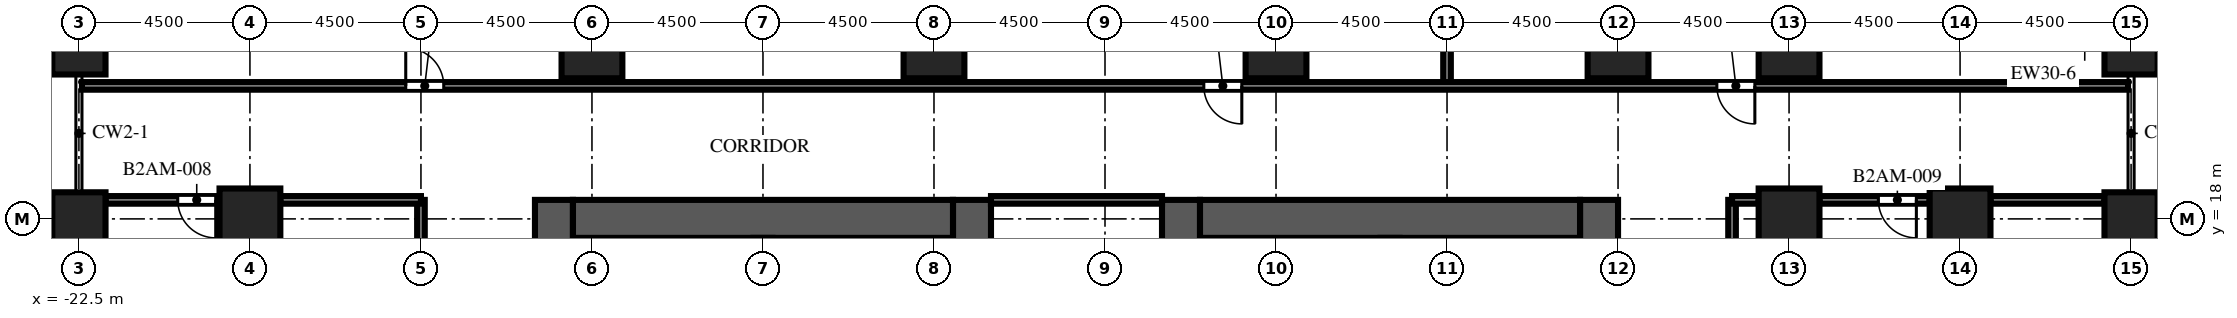
"""IFC4 building model, lengths in metres.
Left out: names, types, materials, properties, quantities, classifications, styles, units other than length and angle.
Written with IfcOpenShell. Run it as: python <this file> out.ifc"""

import sys

from ifc_helpers import new_model, si_unit, direction, frame, frame_2d, origin, origin_2d, place, context, subcontext, project, spatial, rectangle, extrude, element, fill, save


model = new_model("IFC4")
c1 = context("Model", 3, precision=1e-05, world=origin(), true_north=direction((0.0, 1.0)))
c2 = subcontext(c1, "Body", "Model", "MODEL_VIEW")
j1 = project(units=[si_unit("LENGTHUNIT", "METRE"), si_unit("PLANEANGLEUNIT", "RADIAN")], contexts=[c1])
p1 = place(None, origin())
s1 = spatial("IfcSite", under=j1, at=p1, CompositionType="ELEMENT")
p2 = place(p1, origin())
s2 = spatial("IfcBuilding", under=s1, at=p2, CompositionType="ELEMENT")
p3 = place(p2, frame((0.0, 0.0, 70.6)))
s3 = spatial("IfcBuildingStorey", under=s2, at=p3, CompositionType="ELEMENT", Elevation=70.6)
for number, where, z_axis, x_axis in (
    (1, (-22.5, 18.0, 0.0), (0.0, 0.0, 1.0), (1.0, 0.0, 0.0)),
    (2, (-22.5, 22.5, 0.0), (0.0, 0.0, 1.0), (1.0, 0.0, 0.0)),
    (3, (31.5, 18.0, 0.0), (0.0, 0.0, 1.0), (1.0, 0.0, 0.0)),
    (4, (31.5, 22.5, 0.0), (0.0, 0.0, 1.0), (1.0, 0.0, 0.0)),
):
    element("IfcColumn", number, at=place(p3, frame(where, z_axis=z_axis, x_axis=x_axis)), inside=s3, PredefinedType="COLUMN", context=c2, shape_type="SweptSolid", body=[
        extrude(rectangle(XDim=1.4, YDim=1.4, at=origin_2d()), origin(), (0.0, 0.0, 1.0), 6.0),
    ])
for number, where, z_axis, x_axis in (
    (5, (-18.0, 18.0, 0.0), (0.0, 0.0, 1.0), (1.0, 0.0, 0.0)),
    (6, (-9.0, 22.5, 0.0), (0.0, 0.0, 1.0), (1.0, 0.0, 0.0)),
    (7, (0.0, 22.5, 0.0), (0.0, 0.0, 1.0), (1.0, 0.0, 0.0)),
    (8, (9.0, 22.5, 0.0), (0.0, 0.0, 1.0), (1.0, 0.0, 0.0)),
    (9, (18.0, 22.5, 0.0), (0.0, 0.0, 1.0), (1.0, 0.0, 0.0)),
    (10, (22.5, 18.0, 0.0), (0.0, 0.0, 1.0), (1.0, 0.0, 0.0)),
    (11, (22.5, 22.5, 0.0), (0.0, 0.0, 1.0), (1.0, 0.0, 0.0)),
    (12, (27.0, 18.0, 0.0), (0.0, 0.0, 1.0), (1.0, 0.0, 0.0)),
):
    element("IfcColumn", number, at=place(p3, frame(where, z_axis=z_axis, x_axis=x_axis)), inside=s3, PredefinedType="COLUMN", context=c2, shape_type="SweptSolid", body=[
        extrude(rectangle(XDim=1.6, YDim=1.6, at=origin_2d()), origin(), (0.0, 0.0, 1.0), 6.0),
    ])
p4 = place(p3, frame((-10.0, -9.0, 0.0), z_axis=(0.0, 0.0, 1.0), x_axis=(0.0, 1.0, 0.0)))
e13 = element("IfcWall", 13, at=p4, inside=s3, PredefinedType="SHEAR", context=c2, shape_type="SweptSolid", body=[
    extrude(rectangle(XDim=27.5, YDim=1.0, at=frame_2d((13.75, 0.0))), origin(), (0.0, 0.0, 1.0), 6.0),
])
p5 = place(p4, frame((12.55, 0.0, 0.0)))
e14 = element("IfcOpeningElement", 14, at=p5, cuts=e13, PredefinedType="OPENING", context=c2, shape_type="SweptSolid", body=[
    extrude(rectangle(XDim=2.4, YDim=2.4, at=frame_2d((1.2, 1.2))), frame((0.0, 0.51, 0.0), z_axis=(0.0, -1.0, 0.0), x_axis=(1.0, 0.0, 0.0)), (0.0, 0.0, 1.0), 1.02),
])
p6 = place(p4, frame((6.825, 0.0, 0.0)))
e15 = element("IfcOpeningElement", 15, at=p6, cuts=e13, PredefinedType="OPENING", context=c2, shape_type="SweptSolid", body=[
    extrude(rectangle(XDim=1.2, YDim=2.1, at=frame_2d((0.6, 1.05))), frame((0.0, 0.51, 0.0), z_axis=(0.0, -1.0, 0.0), x_axis=(1.0, 0.0, 0.0)), (0.0, 0.0, 1.0), 1.02),
])
p7 = place(p4, frame((19.475, 0.0, 0.0)))
e16 = element("IfcOpeningElement", 16, at=p7, cuts=e13, PredefinedType="OPENING", context=c2, shape_type="SweptSolid", body=[
    extrude(rectangle(XDim=1.2, YDim=2.1, at=frame_2d((0.6, 1.05))), frame((0.0, 0.51, 0.0), z_axis=(0.0, -1.0, 0.0), x_axis=(1.0, 0.0, 0.0)), (0.0, 0.0, 1.0), 1.02),
])
p8 = place(p3, frame((1.0, -9.0, 0.0), z_axis=(0.0, 0.0, 1.0), x_axis=(0.0, 1.0, 0.0)))
e17 = element("IfcWall", 17, at=p8, inside=s3, PredefinedType="SHEAR", context=c2, shape_type="SweptSolid", body=[
    extrude(rectangle(XDim=27.5, YDim=1.0, at=frame_2d((13.75, 0.0))), origin(), (0.0, 0.0, 1.0), 6.0),
])
p9 = place(p8, frame((12.55, 0.0, 0.0)))
e18 = element("IfcOpeningElement", 18, at=p9, cuts=e17, PredefinedType="OPENING", context=c2, shape_type="SweptSolid", body=[
    extrude(rectangle(XDim=2.4, YDim=2.4, at=frame_2d((1.2, 1.2))), frame((0.0, 0.51, 0.0), z_axis=(0.0, -1.0, 0.0), x_axis=(1.0, 0.0, 0.0)), (0.0, 0.0, 1.0), 1.02),
])
p10 = place(p8, frame((5.475, 0.0, 0.0)))
e19 = element("IfcOpeningElement", 19, at=p10, cuts=e17, PredefinedType="OPENING", context=c2, shape_type="SweptSolid", body=[
    extrude(rectangle(XDim=1.2, YDim=2.1, at=frame_2d((0.6, 1.05))), frame((0.0, 0.51, 0.0), z_axis=(0.0, -1.0, 0.0), x_axis=(1.0, 0.0, 0.0)), (0.0, 0.0, 1.0), 1.02),
])
p11 = place(p8, frame((19.475, 0.0, 0.0)))
e20 = element("IfcOpeningElement", 20, at=p11, cuts=e17, PredefinedType="OPENING", context=c2, shape_type="SweptSolid", body=[
    extrude(rectangle(XDim=1.0, YDim=2.1, at=frame_2d((0.5, 1.05))), frame((0.0, 0.51, 0.0), z_axis=(0.0, -1.0, 0.0), x_axis=(1.0, 0.0, 0.0)), (0.0, 0.0, 1.0), 1.02),
])
p12 = place(p8, frame((21.106, 0.0, 0.0)))
e21 = element("IfcOpeningElement", 21, at=p12, cuts=e17, PredefinedType="OPENING", context=c2, shape_type="SweptSolid", body=[
    extrude(rectangle(XDim=1.0, YDim=2.1, at=frame_2d((0.5, 1.05))), frame((0.0, 0.51, 0.0), z_axis=(0.0, -1.0, 0.0), x_axis=(1.0, 0.0, 0.0)), (0.0, 0.0, 1.0), 1.02),
])
p13 = place(p8, frame((23.1, 0.0, 0.0)))
e22 = element("IfcOpeningElement", 22, at=p13, cuts=e17, PredefinedType="OPENING", context=c2, shape_type="SweptSolid", body=[
    extrude(rectangle(XDim=1.0, YDim=2.1, at=frame_2d((0.5, 1.05))), frame((0.0, 0.51, 0.0), z_axis=(0.0, -1.0, 0.0), x_axis=(1.0, 0.0, 0.0)), (0.0, 0.0, 1.0), 1.02),
])
p14 = place(p8, frame((25.094, 0.0, 0.0)))
e23 = element("IfcOpeningElement", 23, at=p14, cuts=e17, PredefinedType="OPENING", context=c2, shape_type="SweptSolid", body=[
    extrude(rectangle(XDim=1.0, YDim=2.1, at=frame_2d((0.5, 1.05))), frame((0.0, 0.51, 0.0), z_axis=(0.0, -1.0, 0.0), x_axis=(1.0, 0.0, 0.0)), (0.0, 0.0, 1.0), 1.02),
])
p15 = place(p3, frame((-9.5, 18.0, 0.0), z_axis=(0.0, 0.0, 1.0), x_axis=(1.0, 0.0, 0.0)))
e24 = element("IfcWall", 24, at=p15, inside=s3, PredefinedType="SHEAR", context=c2, shape_type="SweptSolid", body=[
    extrude(rectangle(XDim=10.0, YDim=1.0, at=frame_2d((5.0, 0.0))), origin(), (0.0, 0.0, 1.0), 6.0),
])
p16 = place(p3, frame((6.5, -9.0, 0.0), z_axis=(0.0, 0.0, 1.0), x_axis=(0.0, 1.0, 0.0)))
e25 = element("IfcWall", 25, at=p16, inside=s3, PredefinedType="SHEAR", context=c2, shape_type="SweptSolid", body=[
    extrude(rectangle(XDim=27.5, YDim=1.0, at=frame_2d((13.75, 0.0))), origin(), (0.0, 0.0, 1.0), 6.0),
])
p17 = place(p16, frame((12.55, 0.0, 0.0)))
e26 = element("IfcOpeningElement", 26, at=p17, cuts=e25, PredefinedType="OPENING", context=c2, shape_type="SweptSolid", body=[
    extrude(rectangle(XDim=2.4, YDim=2.4, at=frame_2d((1.2, 1.2))), frame((0.0, 0.51, 0.0), z_axis=(0.0, -1.0, 0.0), x_axis=(1.0, 0.0, 0.0)), (0.0, 0.0, 1.0), 1.02),
])
p18 = place(p16, frame((5.475, 0.0, 0.0)))
e27 = element("IfcOpeningElement", 27, at=p18, cuts=e25, PredefinedType="OPENING", context=c2, shape_type="SweptSolid", body=[
    extrude(rectangle(XDim=1.2, YDim=2.1, at=frame_2d((0.6, 1.05))), frame((0.0, 0.51, 0.0), z_axis=(0.0, -1.0, 0.0), x_axis=(1.0, 0.0, 0.0)), (0.0, 0.0, 1.0), 1.02),
])
p19 = place(p16, frame((19.475, 0.0, 0.0)))
e28 = element("IfcOpeningElement", 28, at=p19, cuts=e25, PredefinedType="OPENING", context=c2, shape_type="SweptSolid", body=[
    extrude(rectangle(XDim=1.0, YDim=2.1, at=frame_2d((0.5, 1.05))), frame((0.0, 0.51, 0.0), z_axis=(0.0, -1.0, 0.0), x_axis=(1.0, 0.0, 0.0)), (0.0, 0.0, 1.0), 1.02),
])
p20 = place(p16, frame((21.106, 0.0, 0.0)))
e29 = element("IfcOpeningElement", 29, at=p20, cuts=e25, PredefinedType="OPENING", context=c2, shape_type="SweptSolid", body=[
    extrude(rectangle(XDim=1.0, YDim=2.1, at=frame_2d((0.5, 1.05))), frame((0.0, 0.51, 0.0), z_axis=(0.0, -1.0, 0.0), x_axis=(1.0, 0.0, 0.0)), (0.0, 0.0, 1.0), 1.02),
])
p21 = place(p16, frame((23.1, 0.0, 0.0)))
e30 = element("IfcOpeningElement", 30, at=p21, cuts=e25, PredefinedType="OPENING", context=c2, shape_type="SweptSolid", body=[
    extrude(rectangle(XDim=1.0, YDim=2.1, at=frame_2d((0.5, 1.05))), frame((0.0, 0.51, 0.0), z_axis=(0.0, -1.0, 0.0), x_axis=(1.0, 0.0, 0.0)), (0.0, 0.0, 1.0), 1.02),
])
p22 = place(p16, frame((25.094, 0.0, 0.0)))
e31 = element("IfcOpeningElement", 31, at=p22, cuts=e25, PredefinedType="OPENING", context=c2, shape_type="SweptSolid", body=[
    extrude(rectangle(XDim=1.0, YDim=2.1, at=frame_2d((0.5, 1.05))), frame((0.0, 0.51, 0.0), z_axis=(0.0, -1.0, 0.0), x_axis=(1.0, 0.0, 0.0)), (0.0, 0.0, 1.0), 1.02),
])
p23 = place(p3, frame((17.5, -9.0, 0.0), z_axis=(0.0, 0.0, 1.0), x_axis=(0.0, 1.0, 0.0)))
e32 = element("IfcWall", 32, at=p23, inside=s3, PredefinedType="SHEAR", context=c2, shape_type="SweptSolid", body=[
    extrude(rectangle(XDim=27.5, YDim=1.0, at=frame_2d((13.75, 0.0))), origin(), (0.0, 0.0, 1.0), 6.0),
])
p24 = place(p23, frame((12.55, 0.0, 0.0)))
e33 = element("IfcOpeningElement", 33, at=p24, cuts=e32, PredefinedType="OPENING", context=c2, shape_type="SweptSolid", body=[
    extrude(rectangle(XDim=2.4, YDim=2.4, at=frame_2d((1.2, 1.2))), frame((0.0, 0.51, 0.0), z_axis=(0.0, -1.0, 0.0), x_axis=(1.0, 0.0, 0.0)), (0.0, 0.0, 1.0), 1.02),
])
p25 = place(p23, frame((6.825, 0.0, 0.0)))
e34 = element("IfcOpeningElement", 34, at=p25, cuts=e32, PredefinedType="OPENING", context=c2, shape_type="SweptSolid", body=[
    extrude(rectangle(XDim=1.2, YDim=2.1, at=frame_2d((0.6, 1.05))), frame((0.0, 0.51, 0.0), z_axis=(0.0, -1.0, 0.0), x_axis=(1.0, 0.0, 0.0)), (0.0, 0.0, 1.0), 1.02),
])
p26 = place(p23, frame((19.475, 0.0, 0.0)))
e35 = element("IfcOpeningElement", 35, at=p26, cuts=e32, PredefinedType="OPENING", context=c2, shape_type="SweptSolid", body=[
    extrude(rectangle(XDim=1.2, YDim=2.1, at=frame_2d((0.6, 1.05))), frame((0.0, 0.51, 0.0), z_axis=(0.0, -1.0, 0.0), x_axis=(1.0, 0.0, 0.0)), (0.0, 0.0, 1.0), 1.02),
])
p27 = place(p3, frame((7.0, 18.0, 0.0), z_axis=(0.0, 0.0, 1.0), x_axis=(1.0, 0.0, 0.0)))
e36 = element("IfcWall", 36, at=p27, inside=s3, PredefinedType="SHEAR", context=c2, shape_type="SweptSolid", body=[
    extrude(rectangle(XDim=10.0, YDim=1.0, at=frame_2d((5.0, 0.0))), origin(), (0.0, 0.0, 1.0), 6.0),
])
p28 = place(p3, frame((-13.5, -9.0, 0.0), z_axis=(0.0, 0.0, 1.0), x_axis=(0.0, 1.0, 0.0)))
e37 = element("IfcWall", 37, at=p28, inside=s3, PredefinedType="PARTITIONING", context=c2, shape_type="SweptSolid", body=[
    extrude(rectangle(XDim=27.5, YDim=0.2, at=frame_2d((13.75, 0.0))), origin(), (0.0, 0.0, 1.0), 5.4),
])
p29 = place(p28, frame((10.85, 0.0, 0.0)))
e38 = element("IfcOpeningElement", 38, at=p29, cuts=e37, PredefinedType="OPENING", context=c2, shape_type="SweptSolid", body=[
    extrude(rectangle(XDim=1.0, YDim=2.1, at=frame_2d((0.5, 1.05))), frame((0.0, 0.11, 0.0), z_axis=(0.0, -1.0, 0.0), x_axis=(1.0, 0.0, 0.0)), (0.0, 0.0, 1.0), 0.22),
])
p30 = place(p3, frame((13.5, 21.5, 0.0), z_axis=(0.0, 0.0, 1.0), x_axis=(0.0, 1.0, 0.0)))
e39 = element("IfcWall", 39, at=p30, inside=s3, PredefinedType="PARTITIONING", context=c2, shape_type="SweptSolid", body=[
    extrude(rectangle(XDim=4.8, YDim=0.2, at=frame_2d((2.4, 0.0))), origin(), (0.0, 0.0, 1.0), 5.4),
])
p31 = place(p3, frame((21.0, 18.5, 0.0), z_axis=(0.0, 0.0, 1.0), x_axis=(0.0, -1.0, 0.0)))
e40 = element("IfcWall", 40, at=p31, inside=s3, PredefinedType="PARTITIONING", context=c2, shape_type="SweptSolid", body=[
    extrude(rectangle(XDim=27.5, YDim=0.2, at=frame_2d((13.75, 0.0))), origin(), (0.0, 0.0, 1.0), 5.4),
])
p32 = place(p31, frame((19.4, 0.0, 0.0)))
e41 = element("IfcOpeningElement", 41, at=p32, cuts=e40, PredefinedType="OPENING", context=c2, shape_type="SweptSolid", body=[
    extrude(rectangle(XDim=1.0, YDim=2.1, at=frame_2d((0.5, 1.05))), frame((0.0, 0.11, 0.0), z_axis=(0.0, -1.0, 0.0), x_axis=(1.0, 0.0, 0.0)), (0.0, 0.0, 1.0), 0.22),
])
p33 = place(p3, frame((-18.8, 18.5, 0.0), z_axis=(0.0, 0.0, 1.0), x_axis=(-1.0, 0.0, 0.0)))
e42 = element("IfcWall", 42, at=p33, inside=s3, PredefinedType="PARTITIONING", context=c2, shape_type="SweptSolid", body=[
    extrude(rectangle(XDim=3.0, YDim=0.2, at=frame_2d((1.5, 0.0))), origin(), (0.0, 0.0, 1.0), 5.4),
])
p34 = place(p33, frame((0.1, 0.0, 0.0)))
e43 = element("IfcOpeningElement", 43, at=p34, cuts=e42, PredefinedType="OPENING", context=c2, shape_type="SweptSolid", body=[
    extrude(rectangle(XDim=1.0, YDim=2.1, at=frame_2d((0.5, 1.05))), frame((0.0, 0.11, 0.0), z_axis=(0.0, -1.0, 0.0), x_axis=(1.0, 0.0, 0.0)), (0.0, 0.0, 1.0), 0.22),
])
p35 = place(p3, frame((-17.2, 18.5, 0.0), z_axis=(0.0, 0.0, 1.0), x_axis=(1.0, 0.0, 0.0)))
e44 = element("IfcWall", 44, at=p35, inside=s3, PredefinedType="PARTITIONING", context=c2, shape_type="SweptSolid", body=[
    extrude(rectangle(XDim=3.7, YDim=0.2, at=frame_2d((1.85, 0.0))), origin(), (0.0, 0.0, 1.0), 5.4),
])
p36 = place(p3, frame((1.5, 18.5, 0.0), z_axis=(0.0, 0.0, 1.0), x_axis=(1.0, 0.0, 0.0)))
e45 = element("IfcWall", 45, at=p36, inside=s3, PredefinedType="PARTITIONING", context=c2, shape_type="SweptSolid", body=[
    extrude(rectangle(XDim=4.5, YDim=0.2, at=frame_2d((2.25, 0.0))), origin(), (0.0, 0.0, 1.0), 5.4),
])
p37 = place(p3, frame((21.0, 18.5, 0.0), z_axis=(0.0, 0.0, 1.0), x_axis=(1.0, 0.0, 0.0)))
e46 = element("IfcWall", 46, at=p37, inside=s3, PredefinedType="PARTITIONING", context=c2, shape_type="SweptSolid", body=[
    extrude(rectangle(XDim=0.7, YDim=0.2, at=frame_2d((0.35, 0.0))), origin(), (0.0, 0.0, 1.0), 5.4),
])
p38 = place(p3, frame((26.2, 18.5, 0.0), z_axis=(0.0, 0.0, 1.0), x_axis=(-1.0, 0.0, 0.0)))
e47 = element("IfcWall", 47, at=p38, inside=s3, PredefinedType="PARTITIONING", context=c2, shape_type="SweptSolid", body=[
    extrude(rectangle(XDim=2.9, YDim=0.2, at=frame_2d((1.45, 0.0))), origin(), (0.0, 0.0, 1.0), 5.4),
])
p39 = place(p38, frame((0.35, 0.0, 0.0)))
e48 = element("IfcOpeningElement", 48, at=p39, cuts=e47, PredefinedType="OPENING", context=c2, shape_type="SweptSolid", body=[
    extrude(rectangle(XDim=1.0, YDim=2.1, at=frame_2d((0.5, 1.05))), frame((0.0, 0.11, 0.0), z_axis=(0.0, -1.0, 0.0), x_axis=(1.0, 0.0, 0.0)), (0.0, 0.0, 1.0), 0.22),
])
p40 = place(p3, frame((27.8, 18.5, 0.0), z_axis=(0.0, 0.0, 1.0), x_axis=(1.0, 0.0, 0.0)))
e49 = element("IfcWall", 49, at=p40, inside=s3, PredefinedType="PARTITIONING", context=c2, shape_type="SweptSolid", body=[
    extrude(rectangle(XDim=3.0, YDim=0.2, at=frame_2d((1.5, 0.0))), origin(), (0.0, 0.0, 1.0), 5.4),
])
p41 = place(p3, frame((-22.42, 21.5, 0.0), z_axis=(0.0, 0.0, 1.0), x_axis=(1.0, 0.0, 0.0)))
e50 = element("IfcWall", 50, at=p41, inside=s3, PredefinedType="PARTITIONING", context=c2, shape_type="SweptSolid", body=[
    extrude(rectangle(XDim=53.84, YDim=0.2, at=frame_2d((26.92, 0.0))), origin(), (0.0, 0.0, 1.0), 5.4),
])
p42 = place(p41, frame((8.52, 0.0, 0.0)))
e51 = element("IfcOpeningElement", 51, at=p42, cuts=e50, PredefinedType="OPENING", context=c2, shape_type="SweptSolid", body=[
    extrude(rectangle(XDim=1.0, YDim=2.1, at=frame_2d((0.5, 1.05))), frame((0.0, 0.11, 0.0), z_axis=(0.0, -1.0, 0.0), x_axis=(1.0, 0.0, 0.0)), (0.0, 0.0, 1.0), 0.22),
])
p43 = place(p41, frame((29.52, 0.0, 0.0)))
e52 = element("IfcOpeningElement", 52, at=p43, cuts=e50, PredefinedType="OPENING", context=c2, shape_type="SweptSolid", body=[
    extrude(rectangle(XDim=1.0, YDim=2.1, at=frame_2d((0.5, 1.05))), frame((0.0, 0.11, 0.0), z_axis=(0.0, -1.0, 0.0), x_axis=(1.0, 0.0, 0.0)), (0.0, 0.0, 1.0), 0.22),
])
p44 = place(p41, frame((43.02, 0.0, 0.0)))
e53 = element("IfcOpeningElement", 53, at=p44, cuts=e50, PredefinedType="OPENING", context=c2, shape_type="SweptSolid", body=[
    extrude(rectangle(XDim=1.0, YDim=2.1, at=frame_2d((0.5, 1.05))), frame((0.0, 0.11, 0.0), z_axis=(0.0, -1.0, 0.0), x_axis=(1.0, 0.0, 0.0)), (0.0, 0.0, 1.0), 0.22),
])
p45 = place(p34, origin())
e54 = element("IfcDoor", 54, at=p45, inside=s3, OperationType="SINGLE_SWING_LEFT", PredefinedType="DOOR", context=c2, shape_type="SweptSolid", body=[
    extrude(rectangle(XDim=1.0, YDim=2.1, at=frame_2d((0.5, 1.05))), frame((0.0, 0.025, 0.0), z_axis=(0.0, -1.0, 0.0), x_axis=(1.0, 0.0, 0.0)), (0.0, 0.0, 1.0), 0.05),
])
fill(e43, e54)
p46 = place(p39, origin())
e55 = element("IfcDoor", 55, at=p46, inside=s3, OperationType="SINGLE_SWING_LEFT", PredefinedType="DOOR", context=c2, shape_type="SweptSolid", body=[
    extrude(rectangle(XDim=1.0, YDim=2.1, at=frame_2d((0.5, 1.05))), frame((0.0, 0.025, 0.0), z_axis=(0.0, -1.0, 0.0), x_axis=(1.0, 0.0, 0.0)), (0.0, 0.0, 1.0), 0.05),
])
fill(e48, e55)
p47 = place(p42, origin())
e56 = element("IfcDoor", 56, at=p47, inside=s3, OperationType="SINGLE_SWING_LEFT", PredefinedType="DOOR", context=c2, shape_type="SweptSolid", body=[
    extrude(rectangle(XDim=1.0, YDim=2.1, at=frame_2d((0.5, 1.05))), frame((0.0, 0.025, 0.0), z_axis=(0.0, -1.0, 0.0), x_axis=(1.0, 0.0, 0.0)), (0.0, 0.0, 1.0), 0.05),
])
fill(e51, e56)
p48 = place(p43, origin())
e57 = element("IfcDoor", 57, at=p48, inside=s3, OperationType="SINGLE_SWING_RIGHT", PredefinedType="DOOR", context=c2, shape_type="SweptSolid", body=[
    extrude(rectangle(XDim=1.0, YDim=2.1, at=frame_2d((0.5, 1.05))), frame((0.0, 0.025, 0.0), z_axis=(0.0, -1.0, 0.0), x_axis=(1.0, 0.0, 0.0)), (0.0, 0.0, 1.0), 0.05),
])
fill(e52, e57)
p49 = place(p44, origin())
e58 = element("IfcDoor", 58, at=p49, inside=s3, OperationType="SINGLE_SWING_RIGHT", PredefinedType="DOOR", context=c2, shape_type="SweptSolid", body=[
    extrude(rectangle(XDim=1.0, YDim=2.1, at=frame_2d((0.5, 1.05))), frame((0.0, 0.025, 0.0), z_axis=(0.0, -1.0, 0.0), x_axis=(1.0, 0.0, 0.0)), (0.0, 0.0, 1.0), 0.05),
])
fill(e53, e58)
save(model, sys.argv[1])
